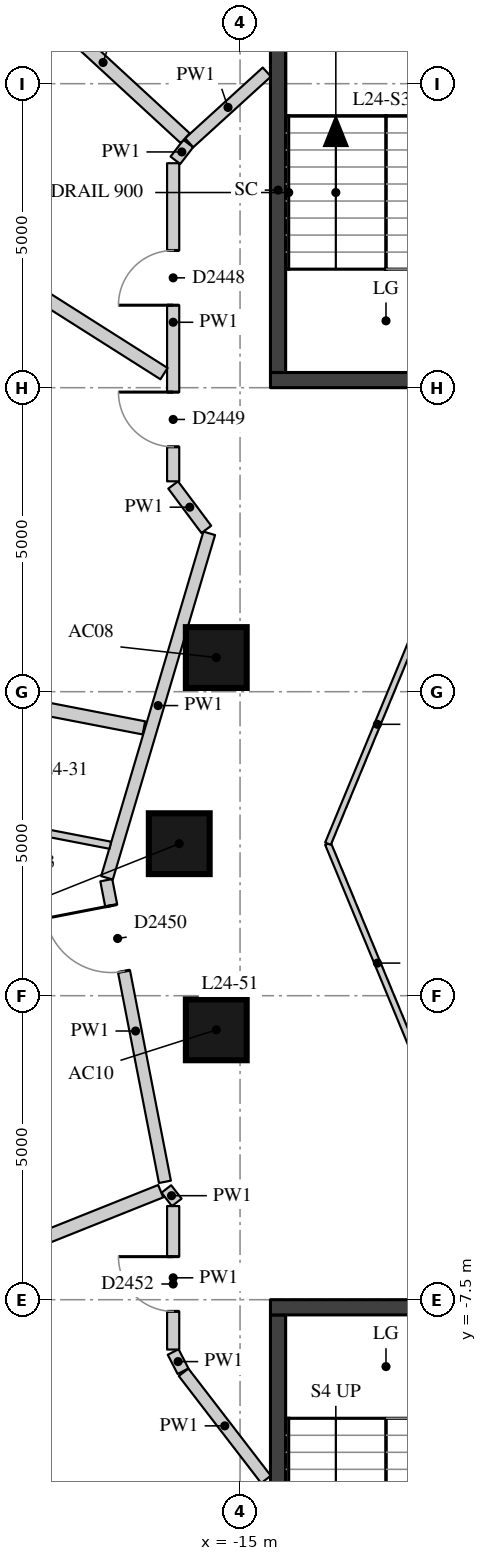
"""IFC4 building model, lengths in metres.
Left out: names, types, materials, properties, quantities, classifications, styles, units other than length and angle.
Written with IfcOpenShell. Run it as: python <this file> out.ifc"""

import sys

from ifc_helpers import new_model, si_unit, direction, frame, frame_2d, origin, origin_2d, place, context, subcontext, project, spatial, rectangle, extrude, element, fill, save


model = new_model("IFC4")
c1 = context("Model", 3, precision=1e-05, world=origin(), true_north=direction((0.0, 1.0)))
c2 = subcontext(c1, "Body", "Model", "MODEL_VIEW")
j1 = project(units=[si_unit("LENGTHUNIT", "METRE"), si_unit("PLANEANGLEUNIT", "RADIAN")], contexts=[c1])
p1 = place(None, origin())
s1 = spatial("IfcSite", under=j1, at=p1, CompositionType="ELEMENT")
p2 = place(p1, origin())
s2 = spatial("IfcBuilding", under=s1, at=p2, CompositionType="ELEMENT")
p3 = place(p2, frame((0.0, 0.0, 88.9)))
s3 = spatial("IfcBuildingStorey", under=s2, at=p3, CompositionType="ELEMENT", Elevation=88.9)
for number, where, z_axis, x_axis in (
    (1, (-15.391, 3.062, 0.0), (0.0, 0.0, 1.0), (1.0, 0.0, 0.0)),
    (2, (-16.0, 0.0, 0.0), (0.0, 0.0, 1.0), (1.0, 0.0, 0.0)),
    (3, (-15.391, -3.062, 0.0), (0.0, 0.0, 1.0), (1.0, 0.0, 0.0)),
):
    element("IfcColumn", number, at=place(p3, frame(where, z_axis=z_axis, x_axis=x_axis)), inside=s3, PredefinedType="COLUMN", context=c2, shape_type="SweptSolid", body=[
        extrude(rectangle(XDim=1.0, YDim=1.0, at=origin_2d()), origin(), (0.0, 0.0, 1.0), 3.3),
    ])
p4 = place(p3, frame((-14.375, 7.75, -0.28), z_axis=(0.0, 0.0, 1.0), x_axis=(0.0, 1.0, 0.0)))
e4 = element("IfcWall", 4, at=p4, inside=s3, PredefinedType="SHEAR", context=c2, shape_type="SweptSolid", body=[
    extrude(rectangle(XDim=6.0, YDim=0.25, at=frame_2d((3.0, 0.0))), origin(), (0.0, 0.0, 1.0), 3.3),
])
p5 = place(p3, frame((-14.5, 7.625, -0.28), z_axis=(0.0, 0.0, 1.0), x_axis=(1.0, 0.0, 0.0)))
e5 = element("IfcWall", 5, at=p5, inside=s3, PredefinedType="SHEAR", context=c2, shape_type="SweptSolid", body=[
    extrude(rectangle(XDim=5.2, YDim=0.25, at=frame_2d((2.6, 0.0))), origin(), (0.0, 0.0, 1.0), 3.3),
])
p6 = place(p3, frame((-14.375, -13.75, -0.28), z_axis=(0.0, 0.0, 1.0), x_axis=(0.0, 1.0, 0.0)))
e6 = element("IfcWall", 6, at=p6, inside=s3, PredefinedType="SHEAR", context=c2, shape_type="SweptSolid", body=[
    extrude(rectangle(XDim=6.0, YDim=0.25, at=frame_2d((3.0, 0.0))), origin(), (0.0, 0.0, 1.0), 3.3),
])
p7 = place(p3, frame((-14.5, -7.625, -0.28), z_axis=(0.0, 0.0, 1.0), x_axis=(1.0, 0.0, 0.0)))
e7 = element("IfcWall", 7, at=p7, inside=s3, PredefinedType="SHEAR", context=c2, shape_type="SweptSolid", body=[
    extrude(rectangle(XDim=5.2, YDim=0.25, at=frame_2d((2.6, 0.0))), origin(), (0.0, 0.0, 1.0), 3.3),
])
p8 = place(p3, frame((-14.573, -10.456, 0.0), z_axis=(0.0, 0.0, 1.0), x_axis=(-0.60967360535, 0.792652568872, 0.0)))
e8 = element("IfcWall", 8, at=p8, inside=s3, PredefinedType="PARTITIONING", context=c2, shape_type="SweptSolid", body=[
    extrude(rectangle(XDim=2.223, YDim=0.2, at=frame_2d((1.111, 0.0))), origin(), (0.0, 0.0, 1.0), 3.02),
])
p9 = place(p3, frame((-15.938, -8.676, 0.0), z_axis=(0.0, 0.0, 1.0), x_axis=(-0.456525695549, 0.889710227717, 0.0)))
e9 = element("IfcWall", 9, at=p9, inside=s3, PredefinedType="PARTITIONING", context=c2, shape_type="SweptSolid", body=[
    extrude(rectangle(XDim=0.356, YDim=0.2, at=frame_2d((0.178, 0.0))), origin(), (0.0, 0.0, 1.0), 3.02),
])
p10 = place(p3, frame((-16.1, -8.32, 0.0), z_axis=(0.0, 0.0, 1.0), x_axis=(0.0, 1.0, 0.0)))
e10 = element("IfcWall", 10, at=p10, inside=s3, PredefinedType="PARTITIONING", context=c2, shape_type="SweptSolid", body=[
    extrude(rectangle(XDim=2.36, YDim=0.2, at=frame_2d((1.18, 0.0))), origin(), (0.0, 0.0, 1.0), 3.02),
])
p11 = place(p10, frame((0.628, 0.0, 0.0)))
e11 = element("IfcOpeningElement", 11, at=p11, cuts=e10, PredefinedType="OPENING", context=c2, shape_type="SweptSolid", body=[
    extrude(rectangle(XDim=0.9, YDim=2.1, at=frame_2d((0.45, 1.05))), frame((0.0, 0.11, 0.0), z_axis=(0.0, -1.0, 0.0), x_axis=(1.0, 0.0, 0.0)), (0.0, 0.0, 1.0), 0.22),
])
p12 = place(p3, frame((-16.041, -5.9, 0.0), z_axis=(0.0, 0.0, 1.0), x_axis=(-0.612489897904, 0.790478415243, 0.0)))
e12 = element("IfcWall", 12, at=p12, inside=s3, PredefinedType="PARTITIONING", context=c2, shape_type="SweptSolid", body=[
    extrude(rectangle(XDim=0.28, YDim=0.2, at=frame_2d((0.14, 0.0))), origin(), (0.0, 0.0, 1.0), 3.02),
])
p13 = place(p3, frame((-16.236, -5.562, 0.0), z_axis=(0.0, 0.0, 1.0), x_axis=(-0.190753296708, 0.981638008532, 0.0)))
e13 = element("IfcWall", 13, at=p13, inside=s3, PredefinedType="PARTITIONING", context=c2, shape_type="SweptSolid", body=[
    extrude(rectangle(XDim=5.054, YDim=0.2, at=frame_2d((2.527, 0.0))), origin(), (0.0, 0.0, 1.0), 3.02),
])
p14 = place(p13, frame((3.528, 0.0, 0.0)))
e14 = element("IfcOpeningElement", 14, at=p14, cuts=e13, PredefinedType="OPENING", context=c2, shape_type="SweptSolid", body=[
    extrude(rectangle(XDim=1.1, YDim=2.1, at=frame_2d((0.55, 1.05))), frame((0.0, 0.11, 0.0), z_axis=(0.0, -1.0, 0.0), x_axis=(1.0, 0.0, 0.0)), (0.0, 0.0, 1.0), 0.22),
])
p15 = place(p3, frame((-17.189, -0.562, 0.0), z_axis=(0.0, 0.0, 1.0), x_axis=(0.28454253649, 0.95866341587, 0.0)))
e15 = element("IfcWall", 15, at=p15, inside=s3, PredefinedType="PARTITIONING", context=c2, shape_type="SweptSolid", body=[
    extrude(rectangle(XDim=5.911, YDim=0.2, at=frame_2d((2.956, 0.0))), origin(), (0.0, 0.0, 1.0), 3.02),
])
p16 = place(p3, frame((-15.555, 5.169, 0.0), z_axis=(0.0, 0.0, 1.0), x_axis=(-0.598284647233, 0.801283645712, 0.0)))
e16 = element("IfcWall", 16, at=p16, inside=s3, PredefinedType="PARTITIONING", context=c2, shape_type="SweptSolid", body=[
    extrude(rectangle(XDim=0.912, YDim=0.2, at=frame_2d((0.456, 0.0))), origin(), (0.0, 0.0, 1.0), 3.02),
])
p17 = place(p3, frame((-16.1, 5.96, 0.0), z_axis=(0.0, 0.0, 1.0), x_axis=(0.0, 1.0, 0.0)))
e17 = element("IfcWall", 17, at=p17, inside=s3, PredefinedType="PARTITIONING", context=c2, shape_type="SweptSolid", body=[
    extrude(rectangle(XDim=5.232, YDim=0.2, at=frame_2d((2.616, 0.0))), origin(), (0.0, 0.0, 1.0), 3.02),
])
p18 = place(p17, frame((2.897, 0.0, 0.0)))
e18 = element("IfcOpeningElement", 18, at=p18, cuts=e17, PredefinedType="OPENING", context=c2, shape_type="SweptSolid", body=[
    extrude(rectangle(XDim=0.9, YDim=2.1, at=frame_2d((0.45, 1.05))), frame((0.0, 0.11, 0.0), z_axis=(0.0, -1.0, 0.0), x_axis=(1.0, 0.0, 0.0)), (0.0, 0.0, 1.0), 0.22),
])
p19 = place(p17, frame((0.568, 0.0, 0.0)))
e19 = element("IfcOpeningElement", 19, at=p19, cuts=e17, PredefinedType="OPENING", context=c2, shape_type="SweptSolid", body=[
    extrude(rectangle(XDim=0.9, YDim=2.1, at=frame_2d((0.45, 1.05))), frame((0.0, 0.11, 0.0), z_axis=(0.0, -1.0, 0.0), x_axis=(1.0, 0.0, 0.0)), (0.0, 0.0, 1.0), 0.22),
])
p20 = place(p3, frame((-16.063, 11.24, 0.0), z_axis=(0.0, 0.0, 1.0), x_axis=(0.609744747854, 0.792597844096, 0.0)))
e20 = element("IfcWall", 20, at=p20, inside=s3, PredefinedType="PARTITIONING", context=c2, shape_type="SweptSolid", body=[
    extrude(rectangle(XDim=0.347, YDim=0.2, at=frame_2d((0.174, 0.0))), origin(), (0.0, 0.0, 1.0), 3.02),
])
p21 = place(p3, frame((-15.837, 11.528, 0.0), z_axis=(0.0, 0.0, 1.0), x_axis=(0.739402681643, 0.673263450946, 0.0)))
e21 = element("IfcWall", 21, at=p21, inside=s3, PredefinedType="PARTITIONING", context=c2, shape_type="SweptSolid", body=[
    extrude(rectangle(XDim=1.728, YDim=0.2, at=frame_2d((0.864, 0.0))), origin(), (0.0, 0.0, 1.0), 3.02),
])
p22 = place(p3, frame((-18.604, 14.094, 0.0), z_axis=(0.0, 0.0, 1.0), x_axis=(0.73529495628, -0.677747244383, 0.0)))
e22 = element("IfcWall", 22, at=p22, inside=s3, PredefinedType="PARTITIONING", context=c2, shape_type="SweptSolid", body=[
    extrude(rectangle(XDim=3.674, YDim=0.22, at=frame_2d((1.837, 0.0))), origin(), (0.0, 0.0, 1.0), 3.02),
])
p23 = place(p3, frame((-21.126, 10.823, 0.0), z_axis=(0.0, 0.0, 1.0), x_axis=(0.844518840625, -0.535525842355, 0.0)))
e23 = element("IfcWall", 23, at=p23, inside=s3, PredefinedType="PARTITIONING", context=c2, shape_type="SweptSolid", body=[
    extrude(rectangle(XDim=5.773, YDim=0.22, at=frame_2d((2.887, 0.0))), origin(), (0.0, 0.0, 1.0), 3.02),
])
p24 = place(p3, frame((-24.118, 3.364, 0.0), z_axis=(0.0, 0.0, 1.0), x_axis=(0.981759939745, -0.19012475039, 0.0)))
e24 = element("IfcWall", 24, at=p24, inside=s3, PredefinedType="PARTITIONING", context=c2, shape_type="SweptSolid", body=[
    extrude(rectangle(XDim=7.677, YDim=0.22, at=frame_2d((3.838, 0.0))), origin(), (0.0, 0.0, 1.0), 2.47),
])
p25 = place(p3, frame((-21.736, -7.887, 0.0), z_axis=(0.0, 0.0, 1.0), x_axis=(0.928522746632, 0.371275516277, 0.0)))
e25 = element("IfcWall", 25, at=p25, inside=s3, PredefinedType="PARTITIONING", context=c2, shape_type="SweptSolid", body=[
    extrude(rectangle(XDim=5.848, YDim=0.22, at=frame_2d((2.924, 0.0))), origin(), (0.0, 0.0, 1.0), 3.02),
])
p26 = place(p3, frame((-17.134, -0.026, 0.0), z_axis=(0.0, 0.0, 1.0), x_axis=(-0.98174757037, 0.190188611835, 0.0)))
e26 = element("IfcWall", 26, at=p26, inside=s3, PredefinedType="PARTITIONING", context=c2, shape_type="SweptSolid", body=[
    extrude(rectangle(XDim=2.504, YDim=0.12, at=frame_2d((1.252, 0.0))), origin(), (0.0, 0.0, 1.0), 3.02),
])
for number, where, z_axis, x_axis in (
    (27, (-11.927, -3.927, 0.0), (0.0, 0.0, 1.0), (-0.383, 0.924, 0.0)),
    (28, (-13.554, 0.0, 0.0), (0.0, 0.0, 1.0), (0.383, 0.924, 0.0)),
):
    element("IfcWall", number, at=place(p3, frame(where, z_axis=z_axis, x_axis=x_axis)), inside=s3, PredefinedType="PARTITIONING", context=c2, shape_type="SweptSolid", body=[
        extrude(rectangle(XDim=4.251, YDim=0.1, at=frame_2d((2.125, 0.0))), origin(), (0.0, 0.0, 1.0), 3.02),
    ])
p27 = place(p18, origin())
e29 = element("IfcDoor", 29, at=p27, inside=s3, OperationType="SINGLE_SWING_LEFT", PredefinedType="DOOR", context=c2, shape_type="SweptSolid", body=[
    extrude(rectangle(XDim=0.9, YDim=2.1, at=frame_2d((0.45, 1.05))), frame((0.0, 0.025, 0.0), z_axis=(0.0, -1.0, 0.0), x_axis=(1.0, 0.0, 0.0)), (0.0, 0.0, 1.0), 0.05),
])
fill(e18, e29)
p28 = place(p19, origin())
e30 = element("IfcDoor", 30, at=p28, inside=s3, OperationType="SINGLE_SWING_RIGHT", PredefinedType="DOOR", context=c2, shape_type="SweptSolid", body=[
    extrude(rectangle(XDim=0.9, YDim=2.1, at=frame_2d((0.45, 1.05))), frame((0.0, 0.025, 0.0), z_axis=(0.0, -1.0, 0.0), x_axis=(1.0, 0.0, 0.0)), (0.0, 0.0, 1.0), 0.05),
])
fill(e19, e30)
p29 = place(p14, origin())
e31 = element("IfcDoor", 31, at=p29, inside=s3, OperationType="SINGLE_SWING_RIGHT", PredefinedType="DOOR", context=c2, shape_type="SweptSolid", body=[
    extrude(rectangle(XDim=1.1, YDim=2.1, at=frame_2d((0.55, 1.05))), frame((0.0, 0.025, 0.0), z_axis=(0.0, -1.0, 0.0), x_axis=(1.0, 0.0, 0.0)), (0.0, 0.0, 1.0), 0.05),
])
fill(e14, e31)
p30 = place(p11, origin())
e32 = element("IfcDoor", 32, at=p30, inside=s3, OperationType="SINGLE_SWING_RIGHT", PredefinedType="DOOR", context=c2, shape_type="SweptSolid", body=[
    extrude(rectangle(XDim=0.9, YDim=2.1, at=frame_2d((0.45, 1.05))), frame((0.0, 0.025, 0.0), z_axis=(0.0, -1.0, 0.0), x_axis=(1.0, 0.0, 0.0)), (0.0, 0.0, 1.0), 0.05),
])
fill(e11, e32)
save(model, sys.argv[1])
